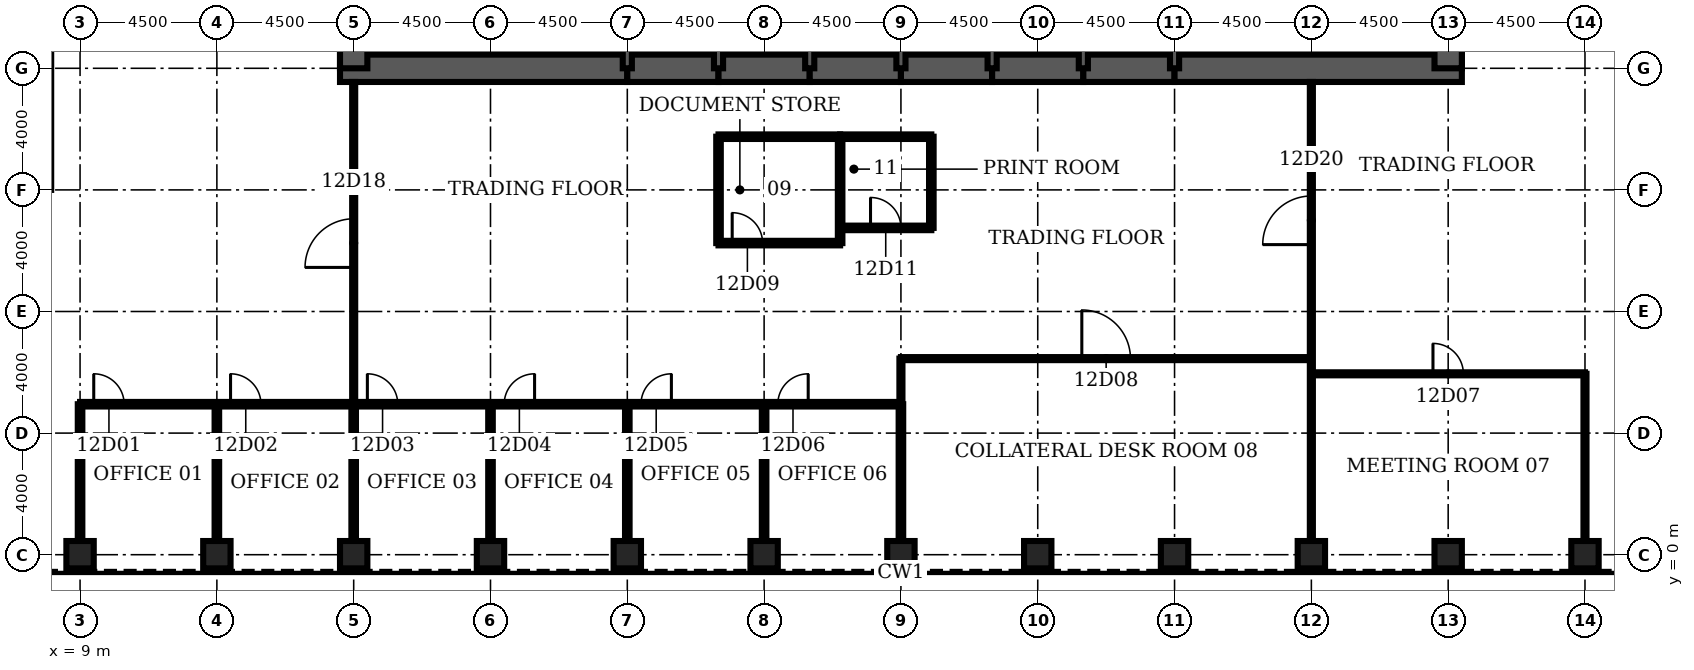
"""IFC4 building model, lengths in metres.
Left out: names, types, materials, properties, quantities, classifications, styles, units other than length and angle.
Written with IfcOpenShell. Run it as: python <this file> out.ifc"""

import sys

from ifc_helpers import new_model, si_unit, direction, frame, frame_2d, origin, origin_2d, place, context, subcontext, project, spatial, rectangle, hollow_rectangle, extrude, element, fill, save


model = new_model("IFC4")
c1 = context("Model", 3, precision=1e-05, world=origin(), true_north=direction((0.0, 1.0)))
c2 = subcontext(c1, "Body", "Model", "MODEL_VIEW")
j1 = project(units=[si_unit("LENGTHUNIT", "METRE"), si_unit("PLANEANGLEUNIT", "RADIAN")], contexts=[c1])
p1 = place(None, origin())
s1 = spatial("IfcSite", under=j1, at=p1, CompositionType="ELEMENT")
p2 = place(p1, origin())
s2 = spatial("IfcBuilding", under=s1, at=p2, CompositionType="ELEMENT")
p3 = place(p2, frame((0.0, 0.0, 59.0)))
s3 = spatial("IfcBuildingStorey", under=s2, at=p3, CompositionType="ELEMENT", Elevation=59.0)
for number, where, z_axis, x_axis in (
    (1, (9.0, 0.0, 0.0), (0.0, 0.0, 1.0), (0.0, 1.0, 0.0)),
    (2, (13.5, 0.0, 0.0), (0.0, 0.0, 1.0), (0.0, 1.0, 0.0)),
    (3, (18.0, 0.0, 0.0), (0.0, 0.0, 1.0), (0.0, 1.0, 0.0)),
    (4, (22.5, 0.0, 0.0), (0.0, 0.0, 1.0), (0.0, 1.0, 0.0)),
    (5, (27.0, 0.0, 0.0), (0.0, 0.0, 1.0), (0.0, 1.0, 0.0)),
    (6, (31.5, 0.0, 0.0), (0.0, 0.0, 1.0), (0.0, 1.0, 0.0)),
    (7, (36.0, 0.0, 0.0), (0.0, 0.0, 1.0), (0.0, 1.0, 0.0)),
    (8, (40.5, 0.0, 0.0), (0.0, 0.0, 1.0), (0.0, 1.0, 0.0)),
    (9, (45.0, 0.0, 0.0), (0.0, 0.0, 1.0), (0.0, 1.0, 0.0)),
    (10, (49.5, 0.0, 0.0), (0.0, 0.0, 1.0), (0.0, 1.0, 0.0)),
    (11, (54.0, 0.0, 0.0), (0.0, 0.0, 1.0), (0.0, 1.0, 0.0)),
    (12, (58.5, 0.0, 0.0), (0.0, 0.0, 1.0), (0.0, 1.0, 0.0)),
):
    element("IfcColumn", number, at=place(p3, frame(where, z_axis=z_axis, x_axis=x_axis)), inside=s3, PredefinedType="COLUMN", context=c2, shape_type="SweptSolid", body=[
        extrude(hollow_rectangle(XDim=0.9, YDim=0.9, WallThickness=0.12, at=origin_2d()), origin(), (0.0, 0.0, 1.0), 4.5),
    ])
p4 = place(p3, frame((17.55, 16.0, 0.0), z_axis=(0.0, 0.0, 1.0), x_axis=(1.0, 0.0, 0.0)))
e13 = element("IfcWall", 13, at=p4, inside=s3, PredefinedType="SHEAR", context=c2, shape_type="SweptSolid", body=[
    extrude(rectangle(XDim=9.45, YDim=0.9, at=frame_2d((4.725, 0.0))), origin(), (0.0, 0.0, 1.0), 4.5),
])
for number, where, z_axis, x_axis in (
    (14, (27.0, 16.0, 0.0), (0.0, 0.0, 1.0), (1.0, 0.0, 0.0)),
    (15, (30.0, 16.0, 0.0), (0.0, 0.0, 1.0), (1.0, 0.0, 0.0)),
    (16, (33.0, 16.0, 0.0), (0.0, 0.0, 1.0), (1.0, 0.0, 0.0)),
    (17, (36.0, 16.0, 0.0), (0.0, 0.0, 1.0), (1.0, 0.0, 0.0)),
    (18, (39.0, 16.0, 0.0), (0.0, 0.0, 1.0), (1.0, 0.0, 0.0)),
    (19, (42.0, 16.0, 0.0), (0.0, 0.0, 1.0), (1.0, 0.0, 0.0)),
):
    element("IfcWall", number, at=place(p3, frame(where, z_axis=z_axis, x_axis=x_axis)), inside=s3, PredefinedType="SHEAR", context=c2, shape_type="SweptSolid", body=[
        extrude(rectangle(XDim=3.0, YDim=0.9, at=frame_2d((1.5, 0.0))), origin(), (0.0, 0.0, 1.0), 4.5),
    ])
p5 = place(p3, frame((45.0, 16.0, 0.0), z_axis=(0.0, 0.0, 1.0), x_axis=(1.0, 0.0, 0.0)))
e20 = element("IfcWall", 20, at=p5, inside=s3, PredefinedType="SHEAR", context=c2, shape_type="SweptSolid", body=[
    extrude(rectangle(XDim=9.45, YDim=0.9, at=frame_2d((4.725, 0.0))), origin(), (0.0, 0.0, 1.0), 4.5),
])
for number, where, z_axis, x_axis in (
    (21, (18.0, 19.2, 0.0), (0.0, 0.0, 1.0), (0.0, -1.0, 0.0)),
    (22, (54.0, 16.0, 0.0), (0.0, 0.0, 1.0), (0.0, 1.0, 0.0)),
):
    element("IfcWall", number, at=place(p3, frame(where, z_axis=z_axis, x_axis=x_axis)), inside=s3, PredefinedType="SHEAR", context=c2, shape_type="SweptSolid", body=[
        extrude(rectangle(XDim=3.2, YDim=0.9, at=frame_2d((1.6, 0.0))), origin(), (0.0, 0.0, 1.0), 4.5),
    ])
for number, where, z_axis, x_axis in (
    (23, (27.0, 16.0, 0.0), (0.0, 0.0, 1.0), (0.0, 1.0, 0.0)),
    (24, (30.0, 16.0, 0.0), (0.0, 0.0, 1.0), (0.0, 1.0, 0.0)),
    (25, (33.0, 16.0, 0.0), (0.0, 0.0, 1.0), (0.0, 1.0, 0.0)),
    (26, (36.0, 16.0, 0.0), (0.0, 0.0, 1.0), (0.0, 1.0, 0.0)),
    (27, (39.0, 16.0, 0.0), (0.0, 0.0, 1.0), (0.0, 1.0, 0.0)),
    (28, (42.0, 16.0, 0.0), (0.0, 0.0, 1.0), (0.0, 1.0, 0.0)),
    (29, (45.0, 16.0, 0.0), (0.0, 0.0, 1.0), (0.0, 1.0, 0.0)),
):
    element("IfcWall", number, at=place(p3, frame(where, z_axis=z_axis, x_axis=x_axis)), inside=s3, PredefinedType="SOLIDWALL", context=c2, shape_type="SweptSolid", body=[
        extrude(rectangle(XDim=3.2, YDim=0.3, at=frame_2d((1.6, 0.0))), origin(), (0.0, 0.0, 1.0), 4.5),
    ])
p6 = place(p3, frame((9.0, 4.95, 0.0), z_axis=(0.0, 0.0, 1.0), x_axis=(1.0, 0.0, 0.0)))
e30 = element("IfcWall", 30, at=p6, inside=s3, PredefinedType="PARTITIONING", context=c2, shape_type="SweptSolid", body=[
    extrude(rectangle(XDim=27.0, YDim=0.15, at=frame_2d((13.5, 0.0))), origin(), (0.0, 0.0, 1.0), 3.0),
])
p7 = place(p6, frame((0.45, 0.0, 0.0)))
e31 = element("IfcOpeningElement", 31, at=p7, cuts=e30, PredefinedType="OPENING", context=c2, shape_type="SweptSolid", body=[
    extrude(rectangle(XDim=1.0, YDim=2.1, at=frame_2d((0.5, 1.05))), frame((0.0, 0.085, 0.0), z_axis=(0.0, -1.0, 0.0), x_axis=(1.0, 0.0, 0.0)), (0.0, 0.0, 1.0), 0.17),
])
p8 = place(p6, frame((4.95, 0.0, 0.0)))
e32 = element("IfcOpeningElement", 32, at=p8, cuts=e30, PredefinedType="OPENING", context=c2, shape_type="SweptSolid", body=[
    extrude(rectangle(XDim=1.0, YDim=2.1, at=frame_2d((0.5, 1.05))), frame((0.0, 0.085, 0.0), z_axis=(0.0, -1.0, 0.0), x_axis=(1.0, 0.0, 0.0)), (0.0, 0.0, 1.0), 0.17),
])
p9 = place(p6, frame((9.45, 0.0, 0.0)))
e33 = element("IfcOpeningElement", 33, at=p9, cuts=e30, PredefinedType="OPENING", context=c2, shape_type="SweptSolid", body=[
    extrude(rectangle(XDim=1.0, YDim=2.1, at=frame_2d((0.5, 1.05))), frame((0.0, 0.085, 0.0), z_axis=(0.0, -1.0, 0.0), x_axis=(1.0, 0.0, 0.0)), (0.0, 0.0, 1.0), 0.17),
])
p10 = place(p6, frame((13.95, 0.0, 0.0)))
e34 = element("IfcOpeningElement", 34, at=p10, cuts=e30, PredefinedType="OPENING", context=c2, shape_type="SweptSolid", body=[
    extrude(rectangle(XDim=1.0, YDim=2.1, at=frame_2d((0.5, 1.05))), frame((0.0, 0.085, 0.0), z_axis=(0.0, -1.0, 0.0), x_axis=(1.0, 0.0, 0.0)), (0.0, 0.0, 1.0), 0.17),
])
p11 = place(p6, frame((18.45, 0.0, 0.0)))
e35 = element("IfcOpeningElement", 35, at=p11, cuts=e30, PredefinedType="OPENING", context=c2, shape_type="SweptSolid", body=[
    extrude(rectangle(XDim=1.0, YDim=2.1, at=frame_2d((0.5, 1.05))), frame((0.0, 0.085, 0.0), z_axis=(0.0, -1.0, 0.0), x_axis=(1.0, 0.0, 0.0)), (0.0, 0.0, 1.0), 0.17),
])
p12 = place(p6, frame((22.95, 0.0, 0.0)))
e36 = element("IfcOpeningElement", 36, at=p12, cuts=e30, PredefinedType="OPENING", context=c2, shape_type="SweptSolid", body=[
    extrude(rectangle(XDim=1.0, YDim=2.1, at=frame_2d((0.5, 1.05))), frame((0.0, 0.085, 0.0), z_axis=(0.0, -1.0, 0.0), x_axis=(1.0, 0.0, 0.0)), (0.0, 0.0, 1.0), 0.17),
])
p13 = place(p3, frame((49.5, 5.95, 0.0), z_axis=(0.0, 0.0, 1.0), x_axis=(1.0, 0.0, 0.0)))
e37 = element("IfcWall", 37, at=p13, inside=s3, PredefinedType="PARTITIONING", context=c2, shape_type="SweptSolid", body=[
    extrude(rectangle(XDim=9.0, YDim=0.1, at=frame_2d((4.5, 0.0))), origin(), (0.0, 0.0, 1.0), 3.0),
])
p14 = place(p13, frame((4.0, 0.0, 0.0)))
e38 = element("IfcOpeningElement", 38, at=p14, cuts=e37, PredefinedType="OPENING", context=c2, shape_type="SweptSolid", body=[
    extrude(rectangle(XDim=1.0, YDim=2.1, at=frame_2d((0.5, 1.05))), frame((0.0, 0.06, 0.0), z_axis=(0.0, -1.0, 0.0), x_axis=(1.0, 0.0, 0.0)), (0.0, 0.0, 1.0), 0.12),
])
p15 = place(p3, frame((36.0, 6.45, 0.0), z_axis=(0.0, 0.0, 1.0), x_axis=(1.0, 0.0, 0.0)))
e39 = element("IfcWall", 39, at=p15, inside=s3, PredefinedType="PARTITIONING", context=c2, shape_type="SweptSolid", body=[
    extrude(rectangle(XDim=13.5, YDim=0.1, at=frame_2d((6.75, 0.0))), origin(), (0.0, 0.0, 1.0), 3.0),
])
p16 = place(p15, frame((5.95, 0.0, 0.0)))
e40 = element("IfcOpeningElement", 40, at=p16, cuts=e39, PredefinedType="OPENING", context=c2, shape_type="SweptSolid", body=[
    extrude(rectangle(XDim=1.6, YDim=2.1, at=frame_2d((0.8, 1.05))), frame((0.0, 0.06, 0.0), z_axis=(0.0, -1.0, 0.0), x_axis=(1.0, 0.0, 0.0)), (0.0, 0.0, 1.0), 0.12),
])
p17 = place(p3, frame((30.0, 10.25, 0.0), z_axis=(0.0, 0.0, 1.0), x_axis=(1.0, 0.0, 0.0)))
e41 = element("IfcWall", 41, at=p17, inside=s3, PredefinedType="PARTITIONING", context=c2, shape_type="SweptSolid", body=[
    extrude(rectangle(XDim=4.0, YDim=0.15, at=frame_2d((2.0, 0.0))), origin(), (0.0, 0.0, 1.0), 3.0),
])
p18 = place(p17, frame((0.45, 0.0, 0.0)))
e42 = element("IfcOpeningElement", 42, at=p18, cuts=e41, PredefinedType="OPENING", context=c2, shape_type="SweptSolid", body=[
    extrude(rectangle(XDim=1.0, YDim=2.1, at=frame_2d((0.5, 1.05))), frame((0.0, 0.085, 0.0), z_axis=(0.0, -1.0, 0.0), x_axis=(1.0, 0.0, 0.0)), (0.0, 0.0, 1.0), 0.17),
])
p19 = place(p3, frame((34.0, 10.75, 0.0), z_axis=(0.0, 0.0, 1.0), x_axis=(1.0, 0.0, 0.0)))
e43 = element("IfcWall", 43, at=p19, inside=s3, PredefinedType="PARTITIONING", context=c2, shape_type="SweptSolid", body=[
    extrude(rectangle(XDim=3.0, YDim=0.15, at=frame_2d((1.5, 0.0))), origin(), (0.0, 0.0, 1.0), 3.0),
])
p20 = place(p19, frame((1.0, 0.0, 0.0)))
e44 = element("IfcOpeningElement", 44, at=p20, cuts=e43, PredefinedType="OPENING", context=c2, shape_type="SweptSolid", body=[
    extrude(rectangle(XDim=1.0, YDim=2.1, at=frame_2d((0.5, 1.05))), frame((0.0, 0.085, 0.0), z_axis=(0.0, -1.0, 0.0), x_axis=(1.0, 0.0, 0.0)), (0.0, 0.0, 1.0), 0.17),
])
p21 = place(p3, frame((30.0, 13.75, 0.0), z_axis=(0.0, 0.0, 1.0), x_axis=(1.0, 0.0, 0.0)))
e45 = element("IfcWall", 45, at=p21, inside=s3, PredefinedType="PARTITIONING", context=c2, shape_type="SweptSolid", body=[
    extrude(rectangle(XDim=4.0, YDim=0.15, at=frame_2d((2.0, 0.0))), origin(), (0.0, 0.0, 1.0), 3.0),
])
p22 = place(p3, frame((34.0, 13.75, 0.0), z_axis=(0.0, 0.0, 1.0), x_axis=(1.0, 0.0, 0.0)))
e46 = element("IfcWall", 46, at=p22, inside=s3, PredefinedType="PARTITIONING", context=c2, shape_type="SweptSolid", body=[
    extrude(rectangle(XDim=3.0, YDim=0.15, at=frame_2d((1.5, 0.0))), origin(), (0.0, 0.0, 1.0), 3.0),
])
for number, where, z_axis, x_axis in (
    (47, (9.0, 0.45, 0.0), (0.0, 0.0, 1.0), (0.0, 1.0, 0.0)),
    (48, (13.5, 0.45, 0.0), (0.0, 0.0, 1.0), (0.0, 1.0, 0.0)),
    (49, (18.0, 0.45, 0.0), (0.0, 0.0, 1.0), (0.0, 1.0, 0.0)),
):
    element("IfcWall", number, at=place(p3, frame(where, z_axis=z_axis, x_axis=x_axis)), inside=s3, PredefinedType="PARTITIONING", context=c2, shape_type="SweptSolid", body=[
        extrude(rectangle(XDim=4.5, YDim=0.15, at=frame_2d((2.25, 0.0))), origin(), (0.0, 0.0, 1.0), 3.0),
    ])
p23 = place(p3, frame((18.0, 4.95, 0.0), z_axis=(0.0, 0.0, 1.0), x_axis=(0.0, 1.0, 0.0)))
e50 = element("IfcWall", 50, at=p23, inside=s3, PredefinedType="PARTITIONING", context=c2, shape_type="SweptSolid", body=[
    extrude(rectangle(XDim=10.6, YDim=0.1, at=frame_2d((5.3, 0.0))), origin(), (0.0, 0.0, 1.0), 3.0),
])
p24 = place(p23, frame((4.5, 0.0, 0.0)))
e51 = element("IfcOpeningElement", 51, at=p24, cuts=e50, PredefinedType="OPENING", context=c2, shape_type="SweptSolid", body=[
    extrude(rectangle(XDim=1.6, YDim=2.1, at=frame_2d((0.8, 1.05))), frame((0.0, 0.06, 0.0), z_axis=(0.0, -1.0, 0.0), x_axis=(1.0, 0.0, 0.0)), (0.0, 0.0, 1.0), 0.12),
])
for number, where, z_axis, x_axis in (
    (52, (22.5, 0.45, 0.0), (0.0, 0.0, 1.0), (0.0, 1.0, 0.0)),
    (53, (27.0, 0.45, 0.0), (0.0, 0.0, 1.0), (0.0, 1.0, 0.0)),
):
    element("IfcWall", number, at=place(p3, frame(where, z_axis=z_axis, x_axis=x_axis)), inside=s3, PredefinedType="PARTITIONING", context=c2, shape_type="SweptSolid", body=[
        extrude(rectangle(XDim=4.5, YDim=0.15, at=frame_2d((2.25, 0.0))), origin(), (0.0, 0.0, 1.0), 3.0),
    ])
p25 = place(p3, frame((30.0, 10.25, 0.0), z_axis=(0.0, 0.0, 1.0), x_axis=(0.0, 1.0, 0.0)))
e54 = element("IfcWall", 54, at=p25, inside=s3, PredefinedType="PARTITIONING", context=c2, shape_type="SweptSolid", body=[
    extrude(rectangle(XDim=3.5, YDim=0.15, at=frame_2d((1.75, 0.0))), origin(), (0.0, 0.0, 1.0), 3.0),
])
p26 = place(p3, frame((31.5, 0.45, 0.0), z_axis=(0.0, 0.0, 1.0), x_axis=(0.0, 1.0, 0.0)))
e55 = element("IfcWall", 55, at=p26, inside=s3, PredefinedType="PARTITIONING", context=c2, shape_type="SweptSolid", body=[
    extrude(rectangle(XDim=4.5, YDim=0.15, at=frame_2d((2.25, 0.0))), origin(), (0.0, 0.0, 1.0), 3.0),
])
p27 = place(p3, frame((34.0, 10.25, 0.0), z_axis=(0.0, 0.0, 1.0), x_axis=(0.0, 1.0, 0.0)))
e56 = element("IfcWall", 56, at=p27, inside=s3, PredefinedType="PARTITIONING", context=c2, shape_type="SweptSolid", body=[
    extrude(rectangle(XDim=3.5, YDim=0.15, at=frame_2d((1.75, 0.0))), origin(), (0.0, 0.0, 1.0), 3.0),
])
p28 = place(p3, frame((36.0, 0.45, 0.0), z_axis=(0.0, 0.0, 1.0), x_axis=(0.0, 1.0, 0.0)))
e57 = element("IfcWall", 57, at=p28, inside=s3, PredefinedType="PARTITIONING", context=c2, shape_type="SweptSolid", body=[
    extrude(rectangle(XDim=4.5, YDim=0.15, at=frame_2d((2.25, 0.0))), origin(), (0.0, 0.0, 1.0), 3.0),
])
p29 = place(p3, frame((36.0, 4.95, 0.0), z_axis=(0.0, 0.0, 1.0), x_axis=(0.0, 1.0, 0.0)))
e58 = element("IfcWall", 58, at=p29, inside=s3, PredefinedType="PARTITIONING", context=c2, shape_type="SweptSolid", body=[
    extrude(rectangle(XDim=1.5, YDim=0.1, at=frame_2d((0.75, 0.0))), origin(), (0.0, 0.0, 1.0), 3.0),
])
p30 = place(p3, frame((37.0, 10.75, 0.0), z_axis=(0.0, 0.0, 1.0), x_axis=(0.0, 1.0, 0.0)))
e59 = element("IfcWall", 59, at=p30, inside=s3, PredefinedType="PARTITIONING", context=c2, shape_type="SweptSolid", body=[
    extrude(rectangle(XDim=3.0, YDim=0.15, at=frame_2d((1.5, 0.0))), origin(), (0.0, 0.0, 1.0), 3.0),
])
p31 = place(p3, frame((49.5, 0.45, 0.0), z_axis=(0.0, 0.0, 1.0), x_axis=(0.0, 1.0, 0.0)))
e60 = element("IfcWall", 60, at=p31, inside=s3, PredefinedType="PARTITIONING", context=c2, shape_type="SweptSolid", body=[
    extrude(rectangle(XDim=15.1, YDim=0.1, at=frame_2d((7.55, 0.0))), origin(), (0.0, 0.0, 1.0), 3.0),
])
p32 = place(p31, frame((9.75, 0.0, 0.0)))
e61 = element("IfcOpeningElement", 61, at=p32, cuts=e60, PredefinedType="OPENING", context=c2, shape_type="SweptSolid", body=[
    extrude(rectangle(XDim=1.6, YDim=2.1, at=frame_2d((0.8, 1.05))), frame((0.0, 0.06, 0.0), z_axis=(0.0, -1.0, 0.0), x_axis=(1.0, 0.0, 0.0)), (0.0, 0.0, 1.0), 0.12),
])
p33 = place(p3, frame((58.5, 0.45, 0.0), z_axis=(0.0, 0.0, 1.0), x_axis=(0.0, 1.0, 0.0)))
e62 = element("IfcWall", 62, at=p33, inside=s3, PredefinedType="PARTITIONING", context=c2, shape_type="SweptSolid", body=[
    extrude(rectangle(XDim=5.5, YDim=0.1, at=frame_2d((2.75, 0.0))), origin(), (0.0, 0.0, 1.0), 3.0),
])
p34 = place(p7, origin())
e63 = element("IfcDoor", 63, at=p34, inside=s3, OperationType="SINGLE_SWING_LEFT", PredefinedType="DOOR", context=c2, shape_type="SweptSolid", body=[
    extrude(rectangle(XDim=1.0, YDim=2.1, at=frame_2d((0.5, 1.05))), frame((0.0, 0.025, 0.0), z_axis=(0.0, -1.0, 0.0), x_axis=(1.0, 0.0, 0.0)), (0.0, 0.0, 1.0), 0.05),
])
fill(e31, e63)
p35 = place(p8, origin())
e64 = element("IfcDoor", 64, at=p35, inside=s3, OperationType="SINGLE_SWING_LEFT", PredefinedType="DOOR", context=c2, shape_type="SweptSolid", body=[
    extrude(rectangle(XDim=1.0, YDim=2.1, at=frame_2d((0.5, 1.05))), frame((0.0, 0.025, 0.0), z_axis=(0.0, -1.0, 0.0), x_axis=(1.0, 0.0, 0.0)), (0.0, 0.0, 1.0), 0.05),
])
fill(e32, e64)
p36 = place(p9, origin())
e65 = element("IfcDoor", 65, at=p36, inside=s3, OperationType="SINGLE_SWING_LEFT", PredefinedType="DOOR", context=c2, shape_type="SweptSolid", body=[
    extrude(rectangle(XDim=1.0, YDim=2.1, at=frame_2d((0.5, 1.05))), frame((0.0, 0.025, 0.0), z_axis=(0.0, -1.0, 0.0), x_axis=(1.0, 0.0, 0.0)), (0.0, 0.0, 1.0), 0.05),
])
fill(e33, e65)
p37 = place(p10, origin())
e66 = element("IfcDoor", 66, at=p37, inside=s3, OperationType="SINGLE_SWING_RIGHT", PredefinedType="DOOR", context=c2, shape_type="SweptSolid", body=[
    extrude(rectangle(XDim=1.0, YDim=2.1, at=frame_2d((0.5, 1.05))), frame((0.0, 0.025, 0.0), z_axis=(0.0, -1.0, 0.0), x_axis=(1.0, 0.0, 0.0)), (0.0, 0.0, 1.0), 0.05),
])
fill(e34, e66)
p38 = place(p11, origin())
e67 = element("IfcDoor", 67, at=p38, inside=s3, OperationType="SINGLE_SWING_RIGHT", PredefinedType="DOOR", context=c2, shape_type="SweptSolid", body=[
    extrude(rectangle(XDim=1.0, YDim=2.1, at=frame_2d((0.5, 1.05))), frame((0.0, 0.025, 0.0), z_axis=(0.0, -1.0, 0.0), x_axis=(1.0, 0.0, 0.0)), (0.0, 0.0, 1.0), 0.05),
])
fill(e35, e67)
p39 = place(p12, origin())
e68 = element("IfcDoor", 68, at=p39, inside=s3, OperationType="SINGLE_SWING_RIGHT", PredefinedType="DOOR", context=c2, shape_type="SweptSolid", body=[
    extrude(rectangle(XDim=1.0, YDim=2.1, at=frame_2d((0.5, 1.05))), frame((0.0, 0.025, 0.0), z_axis=(0.0, -1.0, 0.0), x_axis=(1.0, 0.0, 0.0)), (0.0, 0.0, 1.0), 0.05),
])
fill(e36, e68)
p40 = place(p14, origin())
e69 = element("IfcDoor", 69, at=p40, inside=s3, OperationType="SINGLE_SWING_LEFT", PredefinedType="DOOR", context=c2, shape_type="SweptSolid", body=[
    extrude(rectangle(XDim=1.0, YDim=2.1, at=frame_2d((0.5, 1.05))), frame((0.0, 0.025, 0.0), z_axis=(0.0, -1.0, 0.0), x_axis=(1.0, 0.0, 0.0)), (0.0, 0.0, 1.0), 0.05),
])
fill(e38, e69)
p41 = place(p16, origin())
e70 = element("IfcDoor", 70, at=p41, inside=s3, OperationType="SINGLE_SWING_LEFT", PredefinedType="DOOR", context=c2, shape_type="SweptSolid", body=[
    extrude(rectangle(XDim=1.6, YDim=2.1, at=frame_2d((0.8, 1.05))), frame((0.0, 0.025, 0.0), z_axis=(0.0, -1.0, 0.0), x_axis=(1.0, 0.0, 0.0)), (0.0, 0.0, 1.0), 0.05),
])
fill(e40, e70)
p42 = place(p18, origin())
e71 = element("IfcDoor", 71, at=p42, inside=s3, OperationType="SINGLE_SWING_LEFT", PredefinedType="DOOR", context=c2, shape_type="SweptSolid", body=[
    extrude(rectangle(XDim=1.0, YDim=2.1, at=frame_2d((0.5, 1.05))), frame((0.0, 0.025, 0.0), z_axis=(0.0, -1.0, 0.0), x_axis=(1.0, 0.0, 0.0)), (0.0, 0.0, 1.0), 0.05),
])
fill(e42, e71)
p43 = place(p20, origin())
e72 = element("IfcDoor", 72, at=p43, inside=s3, OperationType="SINGLE_SWING_LEFT", PredefinedType="DOOR", context=c2, shape_type="SweptSolid", body=[
    extrude(rectangle(XDim=1.0, YDim=2.1, at=frame_2d((0.5, 1.05))), frame((0.0, 0.025, 0.0), z_axis=(0.0, -1.0, 0.0), x_axis=(1.0, 0.0, 0.0)), (0.0, 0.0, 1.0), 0.05),
])
fill(e44, e72)
p44 = place(p24, origin())
e73 = element("IfcDoor", 73, at=p44, inside=s3, OperationType="SINGLE_SWING_LEFT", PredefinedType="DOOR", context=c2, shape_type="SweptSolid", body=[
    extrude(rectangle(XDim=1.6, YDim=2.1, at=frame_2d((0.8, 1.05))), frame((0.0, 0.025, 0.0), z_axis=(0.0, -1.0, 0.0), x_axis=(1.0, 0.0, 0.0)), (0.0, 0.0, 1.0), 0.05),
])
fill(e51, e73)
p45 = place(p32, origin())
e74 = element("IfcDoor", 74, at=p45, inside=s3, OperationType="SINGLE_SWING_LEFT", PredefinedType="DOOR", context=c2, shape_type="SweptSolid", body=[
    extrude(rectangle(XDim=1.6, YDim=2.1, at=frame_2d((0.8, 1.05))), frame((0.0, 0.025, 0.0), z_axis=(0.0, -1.0, 0.0), x_axis=(1.0, 0.0, 0.0)), (0.0, 0.0, 1.0), 0.05),
])
fill(e61, e74)
save(model, sys.argv[1])
